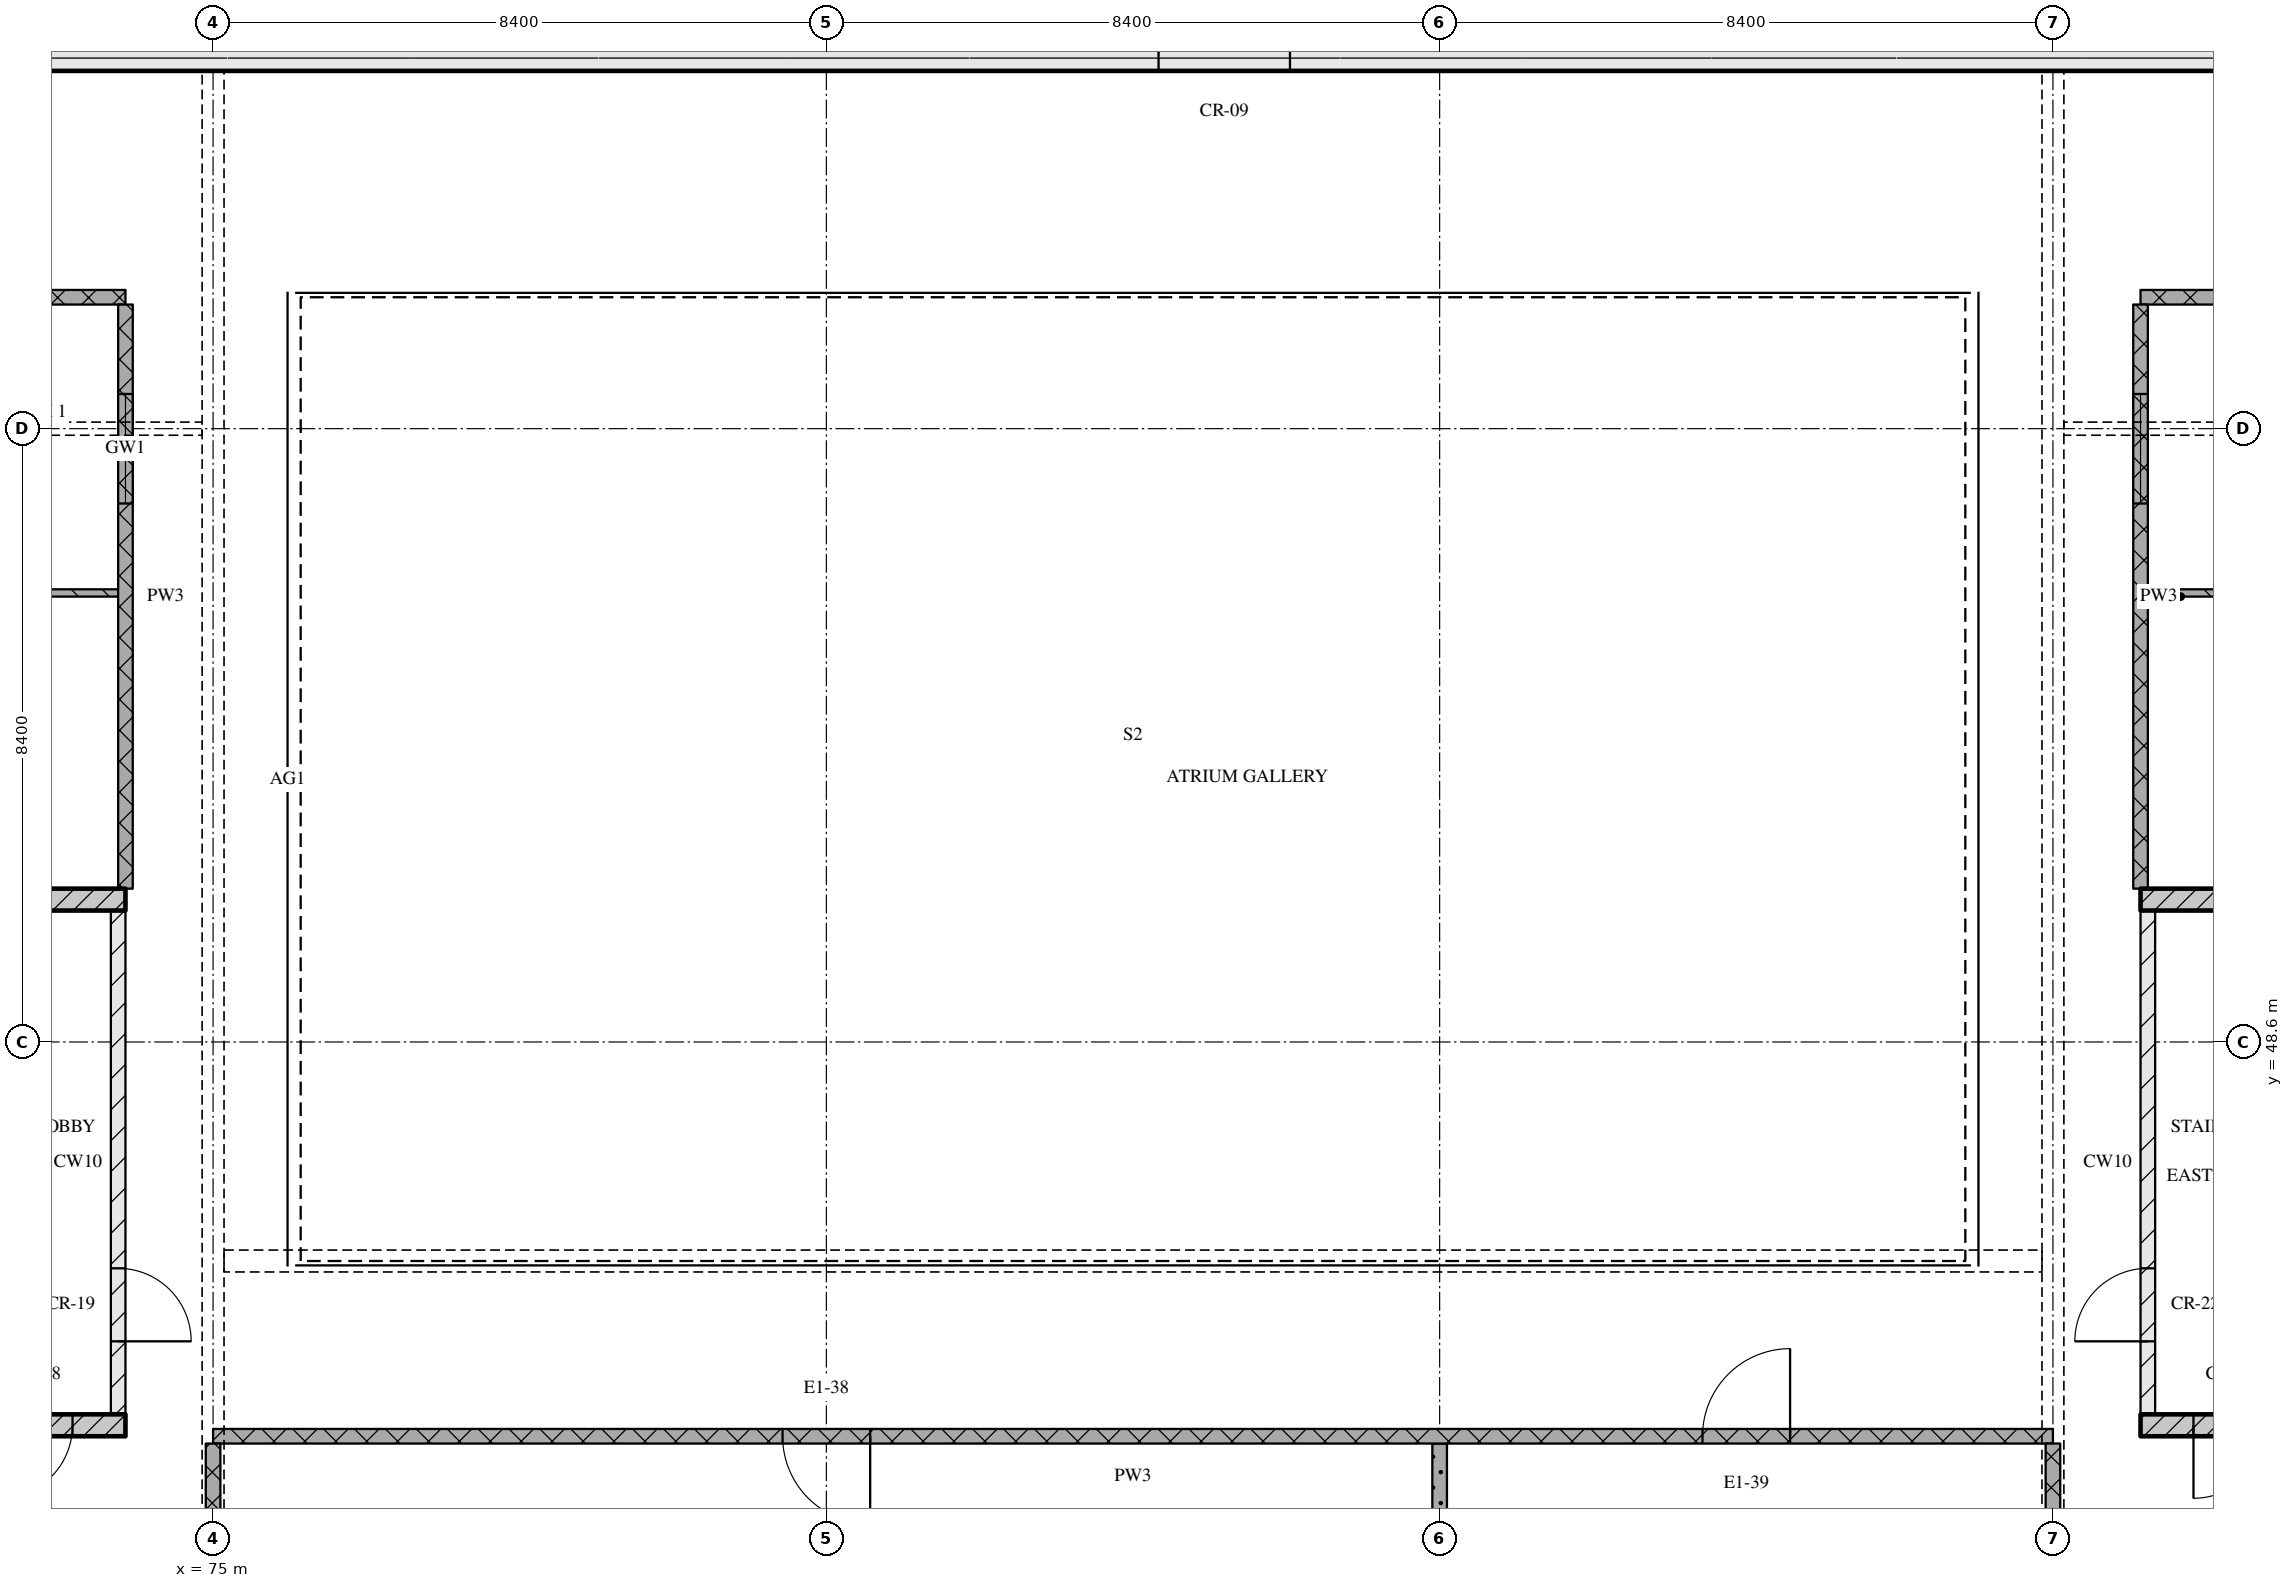
"""IFC4 building model, lengths in metres.
Left out: names, types, materials, properties, quantities, classifications, styles, units other than length and angle.
Written with IfcOpenShell. Run it as: python <this file> out.ifc"""

import sys

from ifc_helpers import new_model, si_unit, direction, frame, frame_2d, origin, place, context, subcontext, project, spatial, rectangle, extrude, element, fill, save


model = new_model("IFC4")
c1 = context("Model", 3, precision=1e-05, world=origin(), true_north=direction((0.0, 1.0)))
c2 = subcontext(c1, "Body", "Model", "MODEL_VIEW")
j1 = project(units=[si_unit("LENGTHUNIT", "METRE"), si_unit("PLANEANGLEUNIT", "RADIAN")], contexts=[c1])
p1 = place(None, origin())
s1 = spatial("IfcSite", under=j1, at=p1, CompositionType="ELEMENT")
p2 = place(p1, origin())
s2 = spatial("IfcBuilding", under=s1, at=p2, CompositionType="ELEMENT")
p3 = place(p2, frame((0.0, 0.0, 267.15)))
s3 = spatial("IfcBuildingStorey", under=s2, at=p3, CompositionType="ELEMENT", Elevation=267.15)
p4 = place(p3, frame((67.3, 62.15, 0.0), z_axis=(0.0, 0.0, 1.0), x_axis=(1.0, 0.0, 0.0)))
e1 = element("IfcWall", 1, at=p4, inside=s3, PredefinedType="SOLIDWALL", context=c2, shape_type="SweptSolid", body=[
    extrude(rectangle(XDim=40.6, YDim=0.5, at=frame_2d((20.3, 0.0))), origin(), (0.0, 0.0, 1.0), 3.32),
])
p5 = place(p4, frame((20.65, 0.0, 0.0)))
e2 = element("IfcOpeningElement", 2, at=p5, cuts=e1, PredefinedType="OPENING", context=c2, shape_type="SweptSolid", body=[
    extrude(rectangle(XDim=1.8, YDim=2.1, at=frame_2d((0.9, 1.05))), frame((0.0, 0.26, 0.0), z_axis=(0.0, -1.0, 0.0), x_axis=(1.0, 0.0, 0.0)), (0.0, 0.0, 1.0), 0.52),
])
p6 = place(p3, frame((68.2, 43.35, 0.0), z_axis=(0.0, 0.0, 1.0), x_axis=(1.0, 0.0, 0.0)))
e3 = element("IfcWall", 3, at=p6, inside=s3, PredefinedType="SOLIDWALL", context=c2, shape_type="SweptSolid", body=[
    extrude(rectangle(XDim=5.6, YDim=0.3, at=frame_2d((2.8, 0.0))), origin(), (0.0, 0.0, 1.0), 3.32),
])
p7 = place(p6, frame((3.875, 0.0, 0.0)))
e4 = element("IfcOpeningElement", 4, at=p7, cuts=e3, PredefinedType="OPENING", context=c2, shape_type="SweptSolid", body=[
    extrude(rectangle(XDim=1.0, YDim=2.1, at=frame_2d((0.5, 1.05))), frame((0.0, 0.16, 0.0), z_axis=(0.0, -1.0, 0.0), x_axis=(1.0, 0.0, 0.0)), (0.0, 0.0, 1.0), 0.32),
])
p8 = place(p3, frame((73.7, 43.5, 0.0), z_axis=(0.0, 0.0, 1.0), x_axis=(0.0, 1.0, 0.0)))
e5 = element("IfcWall", 5, at=p8, inside=s3, PredefinedType="PARTITIONING", context=c2, shape_type="SweptSolid", body=[
    extrude(rectangle(XDim=6.9, YDim=0.2, at=frame_2d((3.45, 0.0))), origin(), (0.0, 0.0, 1.0), 3.32),
])
p9 = place(p8, frame((1.0, 0.0, 0.0)))
e6 = element("IfcOpeningElement", 6, at=p9, cuts=e5, PredefinedType="OPENING", context=c2, shape_type="SweptSolid", body=[
    extrude(rectangle(XDim=1.0, YDim=2.1, at=frame_2d((0.5, 1.05))), frame((0.0, 0.11, 0.0), z_axis=(0.0, -1.0, 0.0), x_axis=(1.0, 0.0, 0.0)), (0.0, 0.0, 1.0), 0.22),
])
p10 = place(p3, frame((68.2, 50.55, 0.0), z_axis=(0.0, 0.0, 1.0), x_axis=(1.0, 0.0, 0.0)))
e7 = element("IfcWall", 7, at=p10, inside=s3, PredefinedType="SOLIDWALL", context=c2, shape_type="SweptSolid", body=[
    extrude(rectangle(XDim=5.6, YDim=0.3, at=frame_2d((2.8, 0.0))), origin(), (0.0, 0.0, 1.0), 3.32),
])
p11 = place(p3, frame((101.4, 43.35, 0.0), z_axis=(0.0, 0.0, 1.0), x_axis=(1.0, 0.0, 0.0)))
e8 = element("IfcWall", 8, at=p11, inside=s3, PredefinedType="SOLIDWALL", context=c2, shape_type="SweptSolid", body=[
    extrude(rectangle(XDim=5.6, YDim=0.3, at=frame_2d((2.8, 0.0))), origin(), (0.0, 0.0, 1.0), 3.32),
])
p12 = place(p11, frame((0.725, 0.0, 0.0)))
e9 = element("IfcOpeningElement", 9, at=p12, cuts=e8, PredefinedType="OPENING", context=c2, shape_type="SweptSolid", body=[
    extrude(rectangle(XDim=1.0, YDim=2.1, at=frame_2d((0.5, 1.05))), frame((0.0, 0.16, 0.0), z_axis=(0.0, -1.0, 0.0), x_axis=(1.0, 0.0, 0.0)), (0.0, 0.0, 1.0), 0.32),
])
p13 = place(p3, frame((101.5, 43.5, 0.0), z_axis=(0.0, 0.0, 1.0), x_axis=(0.0, 1.0, 0.0)))
e10 = element("IfcWall", 10, at=p13, inside=s3, PredefinedType="PARTITIONING", context=c2, shape_type="SweptSolid", body=[
    extrude(rectangle(XDim=6.9, YDim=0.2, at=frame_2d((3.45, 0.0))), origin(), (0.0, 0.0, 1.0), 3.32),
])
p14 = place(p13, frame((1.0, 0.0, 0.0)))
e11 = element("IfcOpeningElement", 11, at=p14, cuts=e10, PredefinedType="OPENING", context=c2, shape_type="SweptSolid", body=[
    extrude(rectangle(XDim=1.0, YDim=2.1, at=frame_2d((0.5, 1.05))), frame((0.0, 0.11, 0.0), z_axis=(0.0, -1.0, 0.0), x_axis=(1.0, 0.0, 0.0)), (0.0, 0.0, 1.0), 0.22),
])
p15 = place(p3, frame((101.4, 50.55, 0.0), z_axis=(0.0, 0.0, 1.0), x_axis=(1.0, 0.0, 0.0)))
e12 = element("IfcWall", 12, at=p15, inside=s3, PredefinedType="SOLIDWALL", context=c2, shape_type="SweptSolid", body=[
    extrude(rectangle(XDim=5.6, YDim=0.3, at=frame_2d((2.8, 0.0))), origin(), (0.0, 0.0, 1.0), 3.32),
])
p16 = place(p3, frame((100.2, 43.2, 0.0), z_axis=(0.0, 0.0, 1.0), x_axis=(-1.0, 0.0, 0.0)))
e13 = element("IfcWall", 13, at=p16, inside=s3, PredefinedType="PARTITIONING", context=c2, shape_type="SweptSolid", body=[
    extrude(rectangle(XDim=25.2, YDim=0.2, at=frame_2d((12.6, 0.0))), origin(), (0.0, 0.0, 1.0), 3.32),
])
p17 = place(p16, frame((3.6, 0.0, 0.0)))
e14 = element("IfcOpeningElement", 14, at=p17, cuts=e13, PredefinedType="OPENING", context=c2, shape_type="SweptSolid", body=[
    extrude(rectangle(XDim=1.2, YDim=2.1, at=frame_2d((0.6, 1.05))), frame((0.0, 0.11, 0.0), z_axis=(0.0, -1.0, 0.0), x_axis=(1.0, 0.0, 0.0)), (0.0, 0.0, 1.0), 0.22),
])
p18 = place(p16, frame((16.2, 0.0, 0.0)))
e15 = element("IfcOpeningElement", 15, at=p18, cuts=e13, PredefinedType="OPENING", context=c2, shape_type="SweptSolid", body=[
    extrude(rectangle(XDim=1.2, YDim=2.1, at=frame_2d((0.6, 1.05))), frame((0.0, 0.11, 0.0), z_axis=(0.0, -1.0, 0.0), x_axis=(1.0, 0.0, 0.0)), (0.0, 0.0, 1.0), 0.22),
])
p19 = place(p3, frame((69.3, 54.75, 0.0), z_axis=(0.0, 0.0, 1.0), x_axis=(1.0, 0.0, 0.0)))
e16 = element("IfcWall", 16, at=p19, inside=s3, PredefinedType="PARTITIONING", context=c2, shape_type="SweptSolid", body=[
    extrude(rectangle(XDim=4.4, YDim=0.1, at=frame_2d((2.2, 0.0))), origin(), (0.0, 0.0, 1.0), 3.32),
])
p20 = place(p3, frame((101.5, 54.75, 0.0), z_axis=(0.0, 0.0, 1.0), x_axis=(1.0, 0.0, 0.0)))
e17 = element("IfcWall", 17, at=p20, inside=s3, PredefinedType="PARTITIONING", context=c2, shape_type="SweptSolid", body=[
    extrude(rectangle(XDim=4.4, YDim=0.1, at=frame_2d((2.2, 0.0))), origin(), (0.0, 0.0, 1.0), 3.32),
])
p21 = place(p20, frame((1.7, 0.0, 0.0)))
e18 = element("IfcOpeningElement", 18, at=p21, cuts=e17, PredefinedType="OPENING", context=c2, shape_type="SweptSolid", body=[
    extrude(rectangle(XDim=0.9, YDim=2.1, at=frame_2d((0.45, 1.05))), frame((0.0, 0.06, 0.0), z_axis=(0.0, -1.0, 0.0), x_axis=(1.0, 0.0, 0.0)), (0.0, 0.0, 1.0), 0.12),
])
for number, where, z_axis, x_axis in (
    (19, (63.0, 58.8, 0.0), (0.0, 0.0, 1.0), (1.0, 0.0, 0.0)),
    (20, (101.4, 58.8, 0.0), (0.0, 0.0, 1.0), (1.0, 0.0, 0.0)),
):
    element("IfcWall", number, at=place(p3, frame(where, z_axis=z_axis, x_axis=x_axis)), inside=s3, PredefinedType="PARTITIONING", context=c2, shape_type="SweptSolid", body=[
        extrude(rectangle(XDim=10.8, YDim=0.2, at=frame_2d((5.4, 0.0))), origin(), (0.0, 0.0, 1.0), 3.32),
    ])
p22 = place(p3, frame((73.8, 58.7, 0.0), z_axis=(0.0, 0.0, 1.0), x_axis=(0.0, -1.0, 0.0)))
e21 = element("IfcWall", 21, at=p22, inside=s3, PredefinedType="PARTITIONING", context=c2, shape_type="SweptSolid", body=[
    extrude(rectangle(XDim=8.0, YDim=0.2, at=frame_2d((4.0, 0.0))), origin(), (0.0, 0.0, 1.0), 3.32),
])
p23 = place(p22, frame((1.225, 0.0, 0.9)))
e22 = element("IfcOpeningElement", 22, at=p23, cuts=e21, PredefinedType="OPENING", context=c2, shape_type="SweptSolid", body=[
    extrude(rectangle(XDim=1.5, YDim=1.5, at=frame_2d((0.75, 0.75))), frame((0.0, 0.11, 0.0), z_axis=(0.0, -1.0, 0.0), x_axis=(1.0, 0.0, 0.0)), (0.0, 0.0, 1.0), 0.22),
])
p24 = place(p3, frame((75.0, 43.1, 0.0), z_axis=(0.0, 0.0, 1.0), x_axis=(0.0, -1.0, 0.0)))
e23 = element("IfcWall", 23, at=p24, inside=s3, PredefinedType="PARTITIONING", context=c2, shape_type="SweptSolid", body=[
    extrude(rectangle(XDim=2.2, YDim=0.2, at=frame_2d((1.1, 0.0))), origin(), (0.0, 0.0, 1.0), 2.53),
])
p25 = place(p3, frame((91.8, 43.1, 0.0), z_axis=(0.0, 0.0, 1.0), x_axis=(0.0, -1.0, 0.0)))
e24 = element("IfcWall", 24, at=p25, inside=s3, PredefinedType="PARTITIONING", context=c2, shape_type="SweptSolid", body=[
    extrude(rectangle(XDim=2.63, YDim=0.2, at=frame_2d((1.315, 0.0))), origin(), (0.0, 0.0, 1.0), 3.32),
])
p26 = place(p3, frame((100.2, 43.1, 0.0), z_axis=(0.0, 0.0, 1.0), x_axis=(0.0, -1.0, 0.0)))
e25 = element("IfcWall", 25, at=p26, inside=s3, PredefinedType="PARTITIONING", context=c2, shape_type="SweptSolid", body=[
    extrude(rectangle(XDim=2.2, YDim=0.2, at=frame_2d((1.1, 0.0))), origin(), (0.0, 0.0, 1.0), 2.53),
])
p27 = place(p3, frame((101.4, 58.7, 0.0), z_axis=(0.0, 0.0, 1.0), x_axis=(0.0, -1.0, 0.0)))
e26 = element("IfcWall", 26, at=p27, inside=s3, PredefinedType="PARTITIONING", context=c2, shape_type="SweptSolid", body=[
    extrude(rectangle(XDim=8.0, YDim=0.2, at=frame_2d((4.0, 0.0))), origin(), (0.0, 0.0, 1.0), 3.32),
])
p28 = place(p27, frame((1.225, 0.0, 0.9)))
e27 = element("IfcOpeningElement", 27, at=p28, cuts=e26, PredefinedType="OPENING", context=c2, shape_type="SweptSolid", body=[
    extrude(rectangle(XDim=1.5, YDim=1.5, at=frame_2d((0.75, 0.75))), frame((0.0, 0.11, 0.0), z_axis=(0.0, -1.0, 0.0), x_axis=(1.0, 0.0, 0.0)), (0.0, 0.0, 1.0), 0.22),
])
p29 = place(p5, origin())
e28 = element("IfcDoor", 28, at=p29, inside=s3, OperationType="DOUBLE_DOOR_SINGLE_SWING", PredefinedType="DOOR", context=c2, shape_type="SweptSolid", body=[
    extrude(rectangle(XDim=1.8, YDim=2.1, at=frame_2d((0.9, 1.05))), frame((0.0, 0.025, 0.0), z_axis=(0.0, -1.0, 0.0), x_axis=(1.0, 0.0, 0.0)), (0.0, 0.0, 1.0), 0.05),
])
fill(e2, e28)
p30 = place(p7, origin())
e29 = element("IfcDoor", 29, at=p30, inside=s3, OperationType="SINGLE_SWING_RIGHT", PredefinedType="DOOR", context=c2, shape_type="SweptSolid", body=[
    extrude(rectangle(XDim=1.0, YDim=2.1, at=frame_2d((0.5, 1.05))), frame((0.0, 0.025, 0.0), z_axis=(0.0, -1.0, 0.0), x_axis=(1.0, 0.0, 0.0)), (0.0, 0.0, 1.0), 0.05),
])
fill(e4, e29)
p31 = place(p9, origin())
e30 = element("IfcDoor", 30, at=p31, inside=s3, OperationType="SINGLE_SWING_RIGHT", PredefinedType="DOOR", context=c2, shape_type="SweptSolid", body=[
    extrude(rectangle(XDim=1.0, YDim=2.1, at=frame_2d((0.5, 1.05))), frame((0.0, 0.025, 0.0), z_axis=(0.0, -1.0, 0.0), x_axis=(1.0, 0.0, 0.0)), (0.0, 0.0, 1.0), 0.05),
])
fill(e6, e30)
p32 = place(p12, origin())
e31 = element("IfcDoor", 31, at=p32, inside=s3, OperationType="SINGLE_SWING_RIGHT", PredefinedType="DOOR", context=c2, shape_type="SweptSolid", body=[
    extrude(rectangle(XDim=1.0, YDim=2.1, at=frame_2d((0.5, 1.05))), frame((0.0, 0.025, 0.0), z_axis=(0.0, -1.0, 0.0), x_axis=(1.0, 0.0, 0.0)), (0.0, 0.0, 1.0), 0.05),
])
fill(e9, e31)
p33 = place(p14, origin())
e32 = element("IfcDoor", 32, at=p33, inside=s3, OperationType="SINGLE_SWING_LEFT", PredefinedType="DOOR", context=c2, shape_type="SweptSolid", body=[
    extrude(rectangle(XDim=1.0, YDim=2.1, at=frame_2d((0.5, 1.05))), frame((0.0, 0.025, 0.0), z_axis=(0.0, -1.0, 0.0), x_axis=(1.0, 0.0, 0.0)), (0.0, 0.0, 1.0), 0.05),
])
fill(e11, e32)
p34 = place(p17, origin())
e33 = element("IfcDoor", 33, at=p34, inside=s3, OperationType="SINGLE_SWING_RIGHT", PredefinedType="DOOR", context=c2, shape_type="SweptSolid", body=[
    extrude(rectangle(XDim=1.2, YDim=2.1, at=frame_2d((0.6, 1.05))), frame((0.0, 0.025, 0.0), z_axis=(0.0, -1.0, 0.0), x_axis=(1.0, 0.0, 0.0)), (0.0, 0.0, 1.0), 0.05),
])
fill(e14, e33)
p35 = place(p18, origin())
e34 = element("IfcDoor", 34, at=p35, inside=s3, OperationType="SINGLE_SWING_LEFT", PredefinedType="DOOR", context=c2, shape_type="SweptSolid", body=[
    extrude(rectangle(XDim=1.2, YDim=2.1, at=frame_2d((0.6, 1.05))), frame((0.0, 0.025, 0.0), z_axis=(0.0, -1.0, 0.0), x_axis=(1.0, 0.0, 0.0)), (0.0, 0.0, 1.0), 0.05),
])
fill(e15, e34)
p36 = place(p23, origin())
e35 = element("IfcWindow", 35, at=p36, inside=s3, PartitioningType="SINGLE_PANEL", PredefinedType="WINDOW", context=c2, shape_type="SweptSolid", body=[
    extrude(rectangle(XDim=1.5, YDim=1.5, at=frame_2d((0.75, 0.75))), frame((0.0, 0.03, 0.0), z_axis=(0.0, -1.0, 0.0), x_axis=(1.0, 0.0, 0.0)), (0.0, 0.0, 1.0), 0.06),
])
fill(e22, e35)
p37 = place(p28, origin())
e36 = element("IfcWindow", 36, at=p37, inside=s3, PartitioningType="SINGLE_PANEL", PredefinedType="WINDOW", context=c2, shape_type="SweptSolid", body=[
    extrude(rectangle(XDim=1.5, YDim=1.5, at=frame_2d((0.75, 0.75))), frame((0.0, 0.03, 0.0), z_axis=(0.0, -1.0, 0.0), x_axis=(1.0, 0.0, 0.0)), (0.0, 0.0, 1.0), 0.06),
])
fill(e27, e36)
save(model, sys.argv[1])
